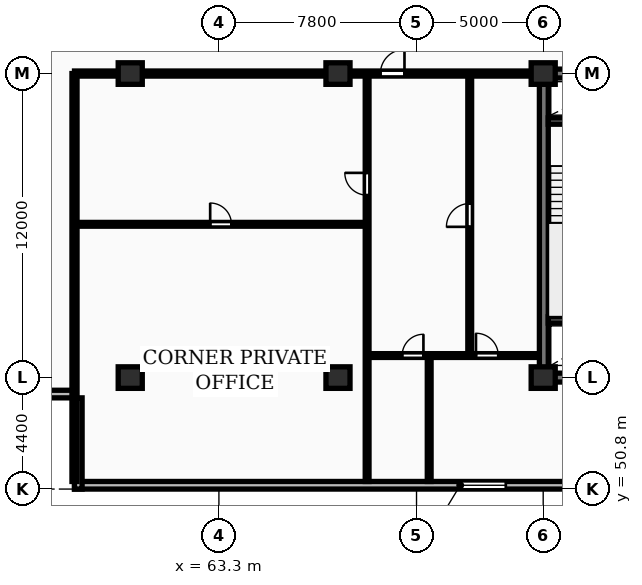
"""IFC4 building model, lengths in metres.
Left out: names, types, materials, properties, quantities, classifications, styles, units other than length and angle.
Written with IfcOpenShell. Run it as: python <this file> out.ifc"""

import sys

from ifc_helpers import new_model, si_unit, direction, frame, frame_2d, origin, origin_2d, place, context, subcontext, project, spatial, rectangle, extrude, element, fill, save


model = new_model("IFC4")
c1 = context("Model", 3, precision=1e-05, world=origin(), true_north=direction((0.0, 1.0)))
c2 = subcontext(c1, "Body", "Model", "MODEL_VIEW")
j1 = project(units=[si_unit("LENGTHUNIT", "METRE"), si_unit("PLANEANGLEUNIT", "RADIAN")], contexts=[c1])
p1 = place(None, origin())
s1 = spatial("IfcSite", under=j1, at=p1, CompositionType="ELEMENT")
p2 = place(p1, origin())
s2 = spatial("IfcBuilding", under=s1, at=p2, CompositionType="ELEMENT")
p3 = place(p2, frame((0.0, 0.0, 80.8)))
s3 = spatial("IfcBuildingStorey", under=s2, at=p3, CompositionType="ELEMENT", Elevation=80.8)
for number, where, z_axis, x_axis in (
    (1, (59.8, 55.2, 0.0), (0.0, 0.0, 1.0), (1.0, 0.0, 0.0)),
    (2, (59.8, 67.2, 0.0), (0.0, 0.0, 1.0), (1.0, 0.0, 0.0)),
    (3, (68.0, 55.2, 0.0), (0.0, 0.0, 1.0), (1.0, 0.0, 0.0)),
    (4, (68.0, 67.2, 0.0), (0.0, 0.0, 1.0), (1.0, 0.0, 0.0)),
    (5, (76.1, 55.2, 0.0), (0.0, 0.0, 1.0), (1.0, 0.0, 0.0)),
    (6, (76.1, 67.2, 0.0), (0.0, 0.0, 1.0), (1.0, 0.0, 0.0)),
):
    element("IfcColumn", number, at=place(p3, frame(where, z_axis=z_axis, x_axis=x_axis)), inside=s3, PredefinedType="COLUMN", context=c2, shape_type="SweptSolid", body=[
        extrude(rectangle(XDim=0.95, YDim=0.85, at=origin_2d()), origin(), (0.0, 0.0, 1.0), 3.25),
    ])
p4 = place(p3, frame((57.6, 50.95, 0.0), z_axis=(0.0, 0.0, 1.0), x_axis=(1.0, 0.0, 0.0)))
e7 = element("IfcWall", 7, at=p4, inside=s3, PredefinedType="STANDARD", context=c2, shape_type="SweptSolid", body=[
    extrude(rectangle(XDim=73.0, YDim=0.3, at=frame_2d((36.5, 0.0))), origin(), (0.0, 0.0, 1.0), 2.97),
])
p5 = place(p4, frame((15.225, 0.0, 0.85)))
e8 = element("IfcOpeningElement", 8, at=p5, cuts=e7, PredefinedType="OPENING", context=c2, shape_type="SweptSolid", body=[
    extrude(rectangle(XDim=1.8, YDim=1.8, at=frame_2d((0.9, 0.9))), frame((0.0, 0.16, 0.0), z_axis=(0.0, -1.0, 0.0), x_axis=(1.0, 0.0, 0.0)), (0.0, 0.0, 1.0), 0.32),
])
p6 = place(p4, frame((58.575, 0.0, 0.85)))
e9 = element("IfcOpeningElement", 9, at=p6, cuts=e7, PredefinedType="OPENING", context=c2, shape_type="SweptSolid", body=[
    extrude(rectangle(XDim=1.8, YDim=1.8, at=frame_2d((0.9, 0.9))), frame((0.0, 0.16, 0.0), z_axis=(0.0, -1.0, 0.0), x_axis=(1.0, 0.0, 0.0)), (0.0, 0.0, 1.0), 0.32),
])
p7 = place(p3, frame((54.0, 54.55, 0.0), z_axis=(0.0, 0.0, 1.0), x_axis=(1.0, 0.0, 0.0)))
e10 = element("IfcWall", 10, at=p7, inside=s3, PredefinedType="STANDARD", context=c2, shape_type="SweptSolid", body=[
    extrude(rectangle(XDim=3.6, YDim=0.3, at=frame_2d((1.8, 0.0))), origin(), (0.0, 0.0, 1.0), 2.97),
])
p8 = place(p3, frame((57.75, 54.4, 0.0), z_axis=(0.0, 0.0, 1.0), x_axis=(0.0, -1.0, 0.0)))
e11 = element("IfcWall", 11, at=p8, inside=s3, PredefinedType="STANDARD", context=c2, shape_type="SweptSolid", body=[
    extrude(rectangle(XDim=3.6, YDim=0.3, at=frame_2d((1.8, 0.0))), origin(), (0.0, 0.0, 1.0), 2.97),
])
p9 = place(p3, frame((75.95, 55.2, 0.0), z_axis=(0.0, 0.0, 1.0), x_axis=(1.0, 0.0, 0.0)))
e12 = element("IfcWall", 12, at=p9, inside=s3, PredefinedType="SHEAR", context=c2, shape_type="SweptSolid", body=[
    extrude(rectangle(XDim=36.3, YDim=0.35, at=frame_2d((18.15, 0.0))), origin(), (0.0, 0.0, 1.0), 3.25),
])
p10 = place(p3, frame((76.125, 55.375, 0.0), z_axis=(0.0, 0.0, 1.0), x_axis=(0.0, 1.0, 0.0)))
e13 = element("IfcWall", 13, at=p10, inside=s3, PredefinedType="SHEAR", context=c2, shape_type="SweptSolid", body=[
    extrude(rectangle(XDim=11.65, YDim=0.35, at=frame_2d((5.825, 0.0))), origin(), (0.0, 0.0, 1.0), 3.25),
])
p11 = place(p3, frame((75.95, 67.2, 0.0), z_axis=(0.0, 0.0, 1.0), x_axis=(1.0, 0.0, 0.0)))
e14 = element("IfcWall", 14, at=p11, inside=s3, PredefinedType="SHEAR", context=c2, shape_type="SweptSolid", body=[
    extrude(rectangle(XDim=36.3, YDim=0.35, at=frame_2d((18.15, 0.0))), origin(), (0.0, 0.0, 1.0), 3.25),
])
p12 = place(p11, frame((5.25, 0.0, 0.0)))
e15 = element("IfcOpeningElement", 15, at=p12, cuts=e14, PredefinedType="OPENING", context=c2, shape_type="SweptSolid", body=[
    extrude(rectangle(XDim=1.0, YDim=2.15, at=frame_2d((0.5, 1.075))), frame((0.0, 0.185, 0.0), z_axis=(0.0, -1.0, 0.0), x_axis=(1.0, 0.0, 0.0)), (0.0, 0.0, 1.0), 0.37),
])
p13 = place(p11, frame((21.6, 0.0, 0.0)))
e16 = element("IfcOpeningElement", 16, at=p13, cuts=e14, PredefinedType="OPENING", context=c2, shape_type="SweptSolid", body=[
    extrude(rectangle(XDim=1.5, YDim=2.2, at=frame_2d((0.75, 1.1))), frame((0.0, 0.185, 0.0), z_axis=(0.0, -1.0, 0.0), x_axis=(1.0, 0.0, 0.0)), (0.0, 0.0, 1.0), 0.37),
])
p14 = place(p11, frame((30.45, 0.0, 0.0)))
e17 = element("IfcOpeningElement", 17, at=p14, cuts=e14, PredefinedType="OPENING", context=c2, shape_type="SweptSolid", body=[
    extrude(rectangle(XDim=1.0, YDim=2.15, at=frame_2d((0.5, 1.075))), frame((0.0, 0.185, 0.0), z_axis=(0.0, -1.0, 0.0), x_axis=(1.0, 0.0, 0.0)), (0.0, 0.0, 1.0), 0.37),
])
for number, where, z_axis, x_axis in (
    (18, (76.3, 57.475, 0.0), (0.0, 0.0, 1.0), (1.0, 0.0, 0.0)),
    (19, (76.3, 65.325, 0.0), (0.0, 0.0, 1.0), (1.0, 0.0, 0.0)),
):
    element("IfcWall", number, at=place(p3, frame(where, z_axis=z_axis, x_axis=x_axis)), inside=s3, PredefinedType="SHEAR", context=c2, shape_type="SweptSolid", body=[
        extrude(rectangle(XDim=3.24, YDim=0.25, at=frame_2d((1.62, 0.0))), origin(), (0.0, 0.0, 1.0), 3.25),
    ])
p15 = place(p3, frame((57.6, 51.1, 0.0), z_axis=(0.0, 0.0, 1.0), x_axis=(0.0, 1.0, 0.0)))
e20 = element("IfcWall", 20, at=p15, inside=s3, PredefinedType="PARTITIONING", context=c2, shape_type="SweptSolid", body=[
    extrude(rectangle(XDim=16.1, YDim=0.2, at=frame_2d((8.05, 0.0))), origin(), (0.0, 0.0, 1.0), 2.97),
])
p16 = place(p3, frame((57.6, 61.25, 0.0), z_axis=(0.0, 0.0, 1.0), x_axis=(1.0, 0.0, 0.0)))
e21 = element("IfcWall", 21, at=p16, inside=s3, PredefinedType="PARTITIONING", context=c2, shape_type="SweptSolid", body=[
    extrude(rectangle(XDim=11.55, YDim=0.15, at=frame_2d((5.775, 0.0))), origin(), (0.0, 0.0, 1.0), 2.97),
])
p17 = place(p16, frame((5.355, 0.0, 0.0)))
e22 = element("IfcOpeningElement", 22, at=p17, cuts=e21, PredefinedType="OPENING", context=c2, shape_type="SweptSolid", body=[
    extrude(rectangle(XDim=0.84, YDim=2.04, at=frame_2d((0.42, 1.02))), frame((0.0, 0.085, 0.0), z_axis=(0.0, -1.0, 0.0), x_axis=(1.0, 0.0, 0.0)), (0.0, 0.0, 1.0), 0.17),
])
p18 = place(p3, frame((69.15, 51.1, 0.0), z_axis=(0.0, 0.0, 1.0), x_axis=(0.0, 1.0, 0.0)))
e23 = element("IfcWall", 23, at=p18, inside=s3, PredefinedType="PARTITIONING", context=c2, shape_type="SweptSolid", body=[
    extrude(rectangle(XDim=16.05, YDim=0.15, at=frame_2d((8.025, 0.0))), origin(), (0.0, 0.0, 1.0), 2.97),
])
p19 = place(p18, frame((11.3, 0.0, 0.0)))
e24 = element("IfcOpeningElement", 24, at=p19, cuts=e23, PredefinedType="OPENING", context=c2, shape_type="SweptSolid", body=[
    extrude(rectangle(XDim=0.88, YDim=2.06, at=frame_2d((0.44, 1.03))), frame((0.0, 0.085, 0.0), z_axis=(0.0, -1.0, 0.0), x_axis=(1.0, 0.0, 0.0)), (0.0, 0.0, 1.0), 0.17),
])
p20 = place(p3, frame((73.2, 56.07, 0.0), z_axis=(0.0, 0.0, 1.0), x_axis=(0.0, 1.0, 0.0)))
e25 = element("IfcWall", 25, at=p20, inside=s3, PredefinedType="PARTITIONING", context=c2, shape_type="SweptSolid", body=[
    extrude(rectangle(XDim=11.08, YDim=0.15, at=frame_2d((5.54, 0.0))), origin(), (0.0, 0.0, 1.0), 2.97),
])
p21 = place(p20, frame((5.08, 0.0, 0.0)))
e26 = element("IfcOpeningElement", 26, at=p21, cuts=e25, PredefinedType="OPENING", context=c2, shape_type="SweptSolid", body=[
    extrude(rectangle(XDim=0.92, YDim=2.08, at=frame_2d((0.46, 1.04))), frame((0.0, 0.085, 0.0), z_axis=(0.0, -1.0, 0.0), x_axis=(1.0, 0.0, 0.0)), (0.0, 0.0, 1.0), 0.17),
])
p22 = place(p3, frame((71.6, 51.1, 0.0), z_axis=(0.0, 0.0, 1.0), x_axis=(0.0, 1.0, 0.0)))
e27 = element("IfcWall", 27, at=p22, inside=s3, PredefinedType="PARTITIONING", context=c2, shape_type="SweptSolid", body=[
    extrude(rectangle(XDim=4.97, YDim=0.15, at=frame_2d((2.485, 0.0))), origin(), (0.0, 0.0, 1.0), 2.97),
])
p23 = place(p3, frame((69.17, 56.07, 0.0), z_axis=(0.0, 0.0, 1.0), x_axis=(1.0, 0.0, 0.0)))
e28 = element("IfcWall", 28, at=p23, inside=s3, PredefinedType="PARTITIONING", context=c2, shape_type="SweptSolid", body=[
    extrude(rectangle(XDim=6.76, YDim=0.15, at=frame_2d((3.38, 0.0))), origin(), (0.0, 0.0, 1.0), 2.97),
])
p24 = place(p23, frame((1.362, 0.0, 0.0)))
e29 = element("IfcOpeningElement", 29, at=p24, cuts=e28, PredefinedType="OPENING", context=c2, shape_type="SweptSolid", body=[
    extrude(rectangle(XDim=0.84, YDim=2.04, at=frame_2d((0.42, 1.02))), frame((0.0, 0.085, 0.0), z_axis=(0.0, -1.0, 0.0), x_axis=(1.0, 0.0, 0.0)), (0.0, 0.0, 1.0), 0.17),
])
p25 = place(p23, frame((4.277, 0.0, 0.0)))
e30 = element("IfcOpeningElement", 30, at=p25, cuts=e28, PredefinedType="OPENING", context=c2, shape_type="SweptSolid", body=[
    extrude(rectangle(XDim=0.88, YDim=2.06, at=frame_2d((0.44, 1.03))), frame((0.0, 0.085, 0.0), z_axis=(0.0, -1.0, 0.0), x_axis=(1.0, 0.0, 0.0)), (0.0, 0.0, 1.0), 0.17),
])
p26 = place(p3, frame((57.6, 67.2, 0.0), z_axis=(0.0, 0.0, 1.0), x_axis=(1.0, 0.0, 0.0)))
e31 = element("IfcWall", 31, at=p26, inside=s3, PredefinedType="PARTITIONING", context=c2, shape_type="SweptSolid", body=[
    extrude(rectangle(XDim=18.35, YDim=0.2, at=frame_2d((9.175, 0.0))), origin(), (0.0, 0.0, 1.0), 2.433),
])
p27 = place(p26, frame((12.075, 0.0, 0.0)))
e32 = element("IfcOpeningElement", 32, at=p27, cuts=e31, PredefinedType="OPENING", context=c2, shape_type="SweptSolid", body=[
    extrude(rectangle(XDim=0.95, YDim=2.15, at=frame_2d((0.475, 1.075))), frame((0.0, 0.11, 0.0), z_axis=(0.0, -1.0, 0.0), x_axis=(1.0, 0.0, 0.0)), (0.0, 0.0, 1.0), 0.22),
])
p28 = place(p5, origin())
e33 = element("IfcWindow", 33, at=p28, inside=s3, PartitioningType="SINGLE_PANEL", PredefinedType="WINDOW", context=c2, shape_type="SweptSolid", body=[
    extrude(rectangle(XDim=1.8, YDim=1.8, at=frame_2d((0.9, 0.9))), frame((0.0, 0.03, 0.0), z_axis=(0.0, -1.0, 0.0), x_axis=(1.0, 0.0, 0.0)), (0.0, 0.0, 1.0), 0.06),
])
fill(e8, e33)
p29 = place(p17, origin())
e34 = element("IfcDoor", 34, at=p29, inside=s3, OperationType="SINGLE_SWING_LEFT", PredefinedType="DOOR", context=c2, shape_type="SweptSolid", body=[
    extrude(rectangle(XDim=0.84, YDim=2.04, at=frame_2d((0.42, 1.02))), frame((0.0, 0.025, 0.0), z_axis=(0.0, -1.0, 0.0), x_axis=(1.0, 0.0, 0.0)), (0.0, 0.0, 1.0), 0.05),
])
fill(e22, e34)
p30 = place(p19, origin())
e35 = element("IfcDoor", 35, at=p30, inside=s3, OperationType="SINGLE_SWING_RIGHT", PredefinedType="DOOR", context=c2, shape_type="SweptSolid", body=[
    extrude(rectangle(XDim=0.88, YDim=2.06, at=frame_2d((0.44, 1.03))), frame((0.0, 0.025, 0.0), z_axis=(0.0, -1.0, 0.0), x_axis=(1.0, 0.0, 0.0)), (0.0, 0.0, 1.0), 0.05),
])
fill(e24, e35)
p31 = place(p21, origin())
e36 = element("IfcDoor", 36, at=p31, inside=s3, OperationType="SINGLE_SWING_LEFT", PredefinedType="DOOR", context=c2, shape_type="SweptSolid", body=[
    extrude(rectangle(XDim=0.92, YDim=2.08, at=frame_2d((0.46, 1.04))), frame((0.0, 0.025, 0.0), z_axis=(0.0, -1.0, 0.0), x_axis=(1.0, 0.0, 0.0)), (0.0, 0.0, 1.0), 0.05),
])
fill(e26, e36)
p32 = place(p24, origin())
e37 = element("IfcDoor", 37, at=p32, inside=s3, OperationType="SINGLE_SWING_RIGHT", PredefinedType="DOOR", context=c2, shape_type="SweptSolid", body=[
    extrude(rectangle(XDim=0.84, YDim=2.04, at=frame_2d((0.42, 1.02))), frame((0.0, 0.025, 0.0), z_axis=(0.0, -1.0, 0.0), x_axis=(1.0, 0.0, 0.0)), (0.0, 0.0, 1.0), 0.05),
])
fill(e29, e37)
p33 = place(p25, origin())
e38 = element("IfcDoor", 38, at=p33, inside=s3, OperationType="SINGLE_SWING_LEFT", PredefinedType="DOOR", context=c2, shape_type="SweptSolid", body=[
    extrude(rectangle(XDim=0.88, YDim=2.06, at=frame_2d((0.44, 1.03))), frame((0.0, 0.025, 0.0), z_axis=(0.0, -1.0, 0.0), x_axis=(1.0, 0.0, 0.0)), (0.0, 0.0, 1.0), 0.05),
])
fill(e30, e38)
p34 = place(p27, origin())
e39 = element("IfcDoor", 39, at=p34, inside=s3, OperationType="SINGLE_SWING_RIGHT", PredefinedType="DOOR", context=c2, shape_type="SweptSolid", body=[
    extrude(rectangle(XDim=0.95, YDim=2.15, at=frame_2d((0.475, 1.075))), frame((0.0, 0.025, 0.0), z_axis=(0.0, -1.0, 0.0), x_axis=(1.0, 0.0, 0.0)), (0.0, 0.0, 1.0), 0.05),
])
fill(e32, e39)
save(model, sys.argv[1])
